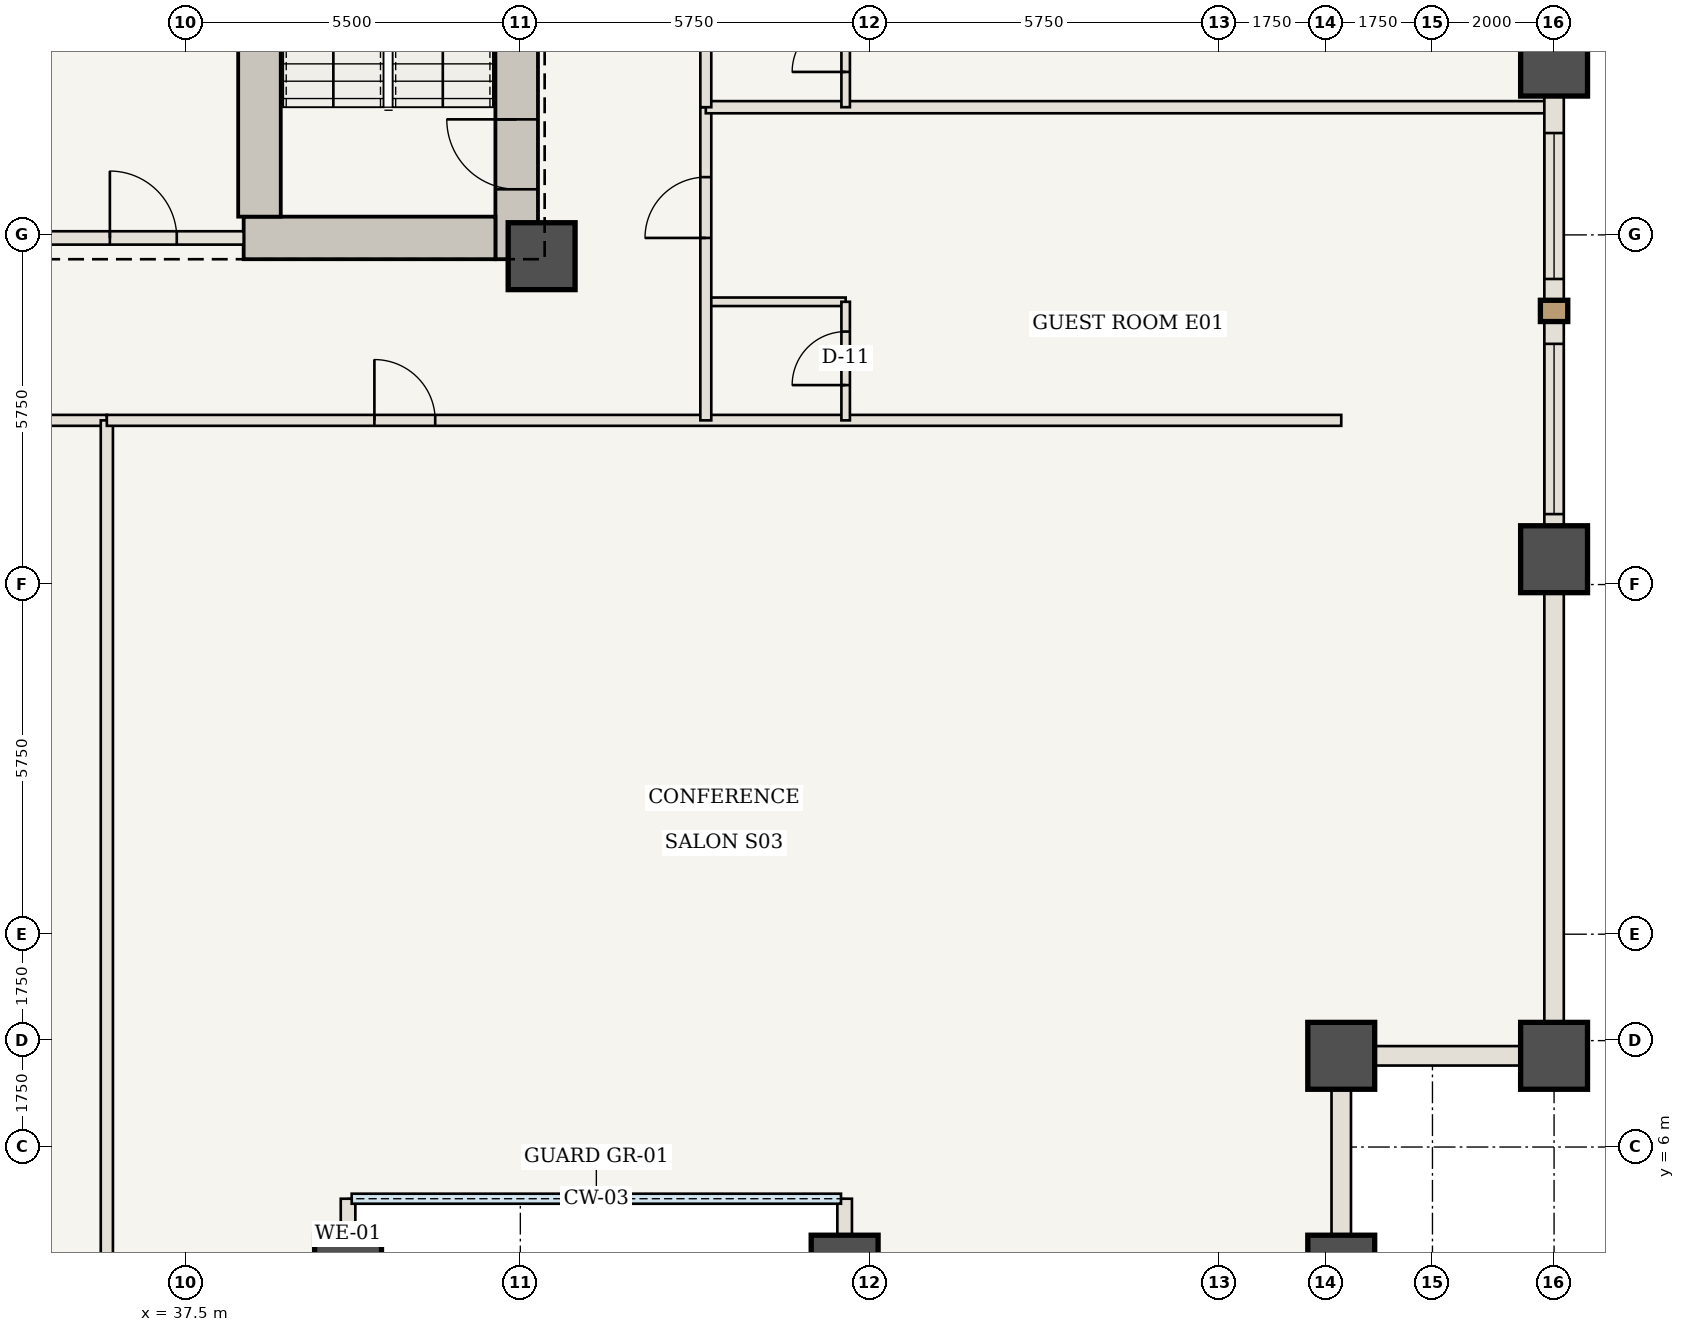
"""IFC4 building model, lengths in metres.
Left out: names, types, materials, properties, quantities, classifications, styles, units other than length and angle.
Written with IfcOpenShell. Run it as: python <this file> out.ifc"""

import sys

from ifc_helpers import new_model, si_unit, direction, frame, frame_2d, origin, origin_2d, place, context, subcontext, project, spatial, rectangle, extrude, element, fill, save


model = new_model("IFC4")
c1 = context("Model", 3, precision=1e-05, world=origin(), true_north=direction((0.0, 1.0)))
c2 = subcontext(c1, "Body", "Model", "MODEL_VIEW")
j1 = project(units=[si_unit("LENGTHUNIT", "METRE"), si_unit("PLANEANGLEUNIT", "RADIAN")], contexts=[c1])
p1 = place(None, origin())
s1 = spatial("IfcSite", under=j1, at=p1, CompositionType="ELEMENT")
p2 = place(p1, origin())
s2 = spatial("IfcBuilding", under=s1, at=p2, CompositionType="ELEMENT")
p3 = place(p2, frame((0.0, 0.0, 70.35)))
s3 = spatial("IfcBuildingStorey", under=s2, at=p3, CompositionType="ELEMENT", Elevation=70.35)
p4 = place(p3, frame((42.94, 20.6, 0.0), z_axis=(0.0, 0.0, 1.0), x_axis=(0.0, 1.0, 0.0)))
e1 = element("IfcWall", 1, at=p4, inside=s3, PredefinedType="SHEAR", context=c2, shape_type="SweptSolid", body=[
    extrude(rectangle(XDim=10.0, YDim=0.7, at=frame_2d((5.0, 0.0))), origin(), (0.0, 0.0, 1.0), 3.5),
])
p5 = place(p4, frame((1.15, 0.0, 0.0)))
e2 = element("IfcOpeningElement", 2, at=p5, cuts=e1, PredefinedType="OPENING", context=c2, shape_type="SweptSolid", body=[
    extrude(rectangle(XDim=1.15, YDim=2.15, at=frame_2d((0.575, 1.075))), frame((0.0, 0.36, 0.0), z_axis=(0.0, -1.0, 0.0), x_axis=(1.0, 0.0, 0.0)), (0.0, 0.0, 1.0), 0.72),
])
p6 = place(p3, frame((38.45, 20.95, 0.0), z_axis=(0.0, 0.0, 1.0), x_axis=(1.0, 0.0, 0.0)))
e3 = element("IfcWall", 3, at=p6, inside=s3, PredefinedType="SHEAR", context=c2, shape_type="SweptSolid", body=[
    extrude(rectangle(XDim=4.14, YDim=0.7, at=frame_2d((2.07, 0.0))), origin(), (0.0, 0.0, 1.0), 3.5),
])
p7 = place(p3, frame((38.71, 21.3, 0.0), z_axis=(0.0, 0.0, 1.0), x_axis=(0.0, 1.0, 0.0)))
e4 = element("IfcWall", 4, at=p7, inside=s3, PredefinedType="SHEAR", context=c2, shape_type="SweptSolid", body=[
    extrude(rectangle(XDim=9.3, YDim=0.7, at=frame_2d((4.65, 0.0))), origin(), (0.0, 0.0, 1.0), 3.5),
])
for number, where, z_axis, x_axis in (
    (5, (43.35, 20.65, 0.0), (0.0, 0.0, 1.0), (1.0, 0.0, 0.0)),
    (6, (56.5, 4.0, 0.0), (0.0, 0.0, 1.0), (1.0, 0.0, 0.0)),
    (7, (56.5, 7.5, 0.0), (0.0, 0.0, 1.0), (1.0, 0.0, 0.0)),
    (8, (60.0, 7.5, 0.0), (0.0, 0.0, 1.0), (1.0, 0.0, 0.0)),
    (9, (60.0, 15.667, 0.0), (0.0, 0.0, 1.0), (1.0, 0.0, 0.0)),
    (10, (60.0, 23.833, 0.0), (0.0, 0.0, 1.0), (1.0, 0.0, 0.0)),
    (11, (40.167, 4.0, 0.0), (0.0, 0.0, 1.0), (1.0, 0.0, 0.0)),
    (12, (48.333, 4.0, 0.0), (0.0, 0.0, 1.0), (1.0, 0.0, 0.0)),
):
    element("IfcColumn", number, at=place(p3, frame(where, z_axis=z_axis, x_axis=x_axis)), inside=s3, PredefinedType="COLUMN", context=c2, shape_type="SweptSolid", body=[
        extrude(rectangle(XDim=1.1, YDim=1.1, at=origin_2d()), origin(), (0.0, 0.0, 1.0), 3.5),
    ])
p8 = place(p3, frame((35.15, 20.95, 0.0), z_axis=(0.0, 0.0, 1.0), x_axis=(1.0, 0.0, 0.0)))
e13 = element("IfcWall", 13, at=p8, inside=s3, PredefinedType="STANDARD", context=c2, shape_type="SweptSolid", body=[
    extrude(rectangle(XDim=3.3, YDim=0.22, at=frame_2d((1.65, 0.0))), origin(), (0.0, 0.0, 1.0), 3.32),
])
p9 = place(p8, frame((1.1, 0.0, 0.0)))
e14 = element("IfcOpeningElement", 14, at=p9, cuts=e13, PredefinedType="OPENING", context=c2, shape_type="SweptSolid", body=[
    extrude(rectangle(XDim=1.1, YDim=2.15, at=frame_2d((0.55, 1.075))), frame((0.0, 0.12, 0.0), z_axis=(0.0, -1.0, 0.0), x_axis=(1.0, 0.0, 0.0)), (0.0, 0.0, 1.0), 0.24),
])
p10 = place(p3, frame((21.8, 17.95, 0.0), z_axis=(0.0, 0.0, 1.0), x_axis=(1.0, 0.0, 0.0)))
e15 = element("IfcWall", 15, at=p10, inside=s3, PredefinedType="STANDARD", context=c2, shape_type="SweptSolid", body=[
    extrude(rectangle(XDim=14.4, YDim=0.18, at=frame_2d((7.2, 0.0))), origin(), (0.0, 0.0, 1.0), 3.32),
])
p11 = place(p10, frame((8.15, 0.0, 0.0)))
e16 = element("IfcOpeningElement", 16, at=p11, cuts=e15, PredefinedType="OPENING", context=c2, shape_type="SweptSolid", body=[
    extrude(rectangle(XDim=1.0, YDim=2.15, at=frame_2d((0.5, 1.075))), frame((0.0, 0.1, 0.0), z_axis=(0.0, -1.0, 0.0), x_axis=(1.0, 0.0, 0.0)), (0.0, 0.0, 1.0), 0.2),
])
p12 = place(p3, frame((36.2, 4.06, 0.0), z_axis=(0.0, 0.0, 1.0), x_axis=(0.0, 1.0, 0.0)))
e17 = element("IfcWall", 17, at=p12, inside=s3, PredefinedType="STANDARD", context=c2, shape_type="SweptSolid", body=[
    extrude(rectangle(XDim=13.89, YDim=0.2, at=frame_2d((6.945, 0.0))), origin(), (0.0, 0.0, 1.0), 3.32),
])
p13 = place(p3, frame((36.2, 17.95, 0.0), z_axis=(0.0, 0.0, 1.0), x_axis=(1.0, 0.0, 0.0)))
e18 = element("IfcWall", 18, at=p13, inside=s3, PredefinedType="STANDARD", context=c2, shape_type="SweptSolid", body=[
    extrude(rectangle(XDim=20.3, YDim=0.18, at=frame_2d((10.15, 0.0))), origin(), (0.0, 0.0, 1.0), 3.32),
])
p14 = place(p13, frame((4.4, 0.0, 0.0)))
e19 = element("IfcOpeningElement", 19, at=p14, cuts=e18, PredefinedType="OPENING", context=c2, shape_type="SweptSolid", body=[
    extrude(rectangle(XDim=1.0, YDim=2.15, at=frame_2d((0.5, 1.075))), frame((0.0, 0.1, 0.0), z_axis=(0.0, -1.0, 0.0), x_axis=(1.0, 0.0, 0.0)), (0.0, 0.0, 1.0), 0.2),
])
p15 = place(p3, frame((46.05, 19.9, 0.0), z_axis=(0.0, 0.0, 1.0), x_axis=(1.0, 0.0, 0.0)))
e20 = element("IfcWall", 20, at=p15, inside=s3, PredefinedType="STANDARD", context=c2, shape_type="SweptSolid", body=[
    extrude(rectangle(XDim=2.3, YDim=0.14, at=frame_2d((1.15, 0.0))), origin(), (0.0, 0.0, 1.0), 3.32),
])
p16 = place(p3, frame((48.35, 17.95, 0.0), z_axis=(0.0, 0.0, 1.0), x_axis=(0.0, 1.0, 0.0)))
e21 = element("IfcWall", 21, at=p16, inside=s3, PredefinedType="STANDARD", context=c2, shape_type="SweptSolid", body=[
    extrude(rectangle(XDim=1.95, YDim=0.14, at=frame_2d((0.975, 0.0))), origin(), (0.0, 0.0, 1.0), 3.32),
])
p17 = place(p16, frame((0.58, 0.0, 0.0)))
e22 = element("IfcOpeningElement", 22, at=p17, cuts=e21, PredefinedType="OPENING", context=c2, shape_type="SweptSolid", body=[
    extrude(rectangle(XDim=0.88, YDim=2.1, at=frame_2d((0.44, 1.05))), frame((0.0, 0.08, 0.0), z_axis=(0.0, -1.0, 0.0), x_axis=(1.0, 0.0, 0.0)), (0.0, 0.0, 1.0), 0.16),
])
p18 = place(p3, frame((46.05, 17.95, 0.0), z_axis=(0.0, 0.0, 1.0), x_axis=(0.0, 1.0, 0.0)))
e23 = element("IfcWall", 23, at=p18, inside=s3, PredefinedType="STANDARD", context=c2, shape_type="SweptSolid", body=[
    extrude(rectangle(XDim=5.15, YDim=0.18, at=frame_2d((2.575, 0.0))), origin(), (0.0, 0.0, 1.0), 3.32),
])
p19 = place(p18, frame((3.0, 0.0, 0.0)))
e24 = element("IfcOpeningElement", 24, at=p19, cuts=e23, PredefinedType="OPENING", context=c2, shape_type="SweptSolid", body=[
    extrude(rectangle(XDim=1.0, YDim=2.15, at=frame_2d((0.5, 1.075))), frame((0.0, 0.1, 0.0), z_axis=(0.0, -1.0, 0.0), x_axis=(1.0, 0.0, 0.0)), (0.0, 0.0, 1.0), 0.2),
])
p20 = place(p3, frame((46.05, 23.1, 0.0), z_axis=(0.0, 0.0, 1.0), x_axis=(1.0, 0.0, 0.0)))
e25 = element("IfcWall", 25, at=p20, inside=s3, PredefinedType="STANDARD", context=c2, shape_type="SweptSolid", body=[
    extrude(rectangle(XDim=13.89, YDim=0.2, at=frame_2d((6.945, 0.0))), origin(), (0.0, 0.0, 1.0), 3.32),
])
p21 = place(p3, frame((48.35, 23.1, 0.0), z_axis=(0.0, 0.0, 1.0), x_axis=(0.0, 1.0, 0.0)))
e26 = element("IfcWall", 26, at=p21, inside=s3, PredefinedType="STANDARD", context=c2, shape_type="SweptSolid", body=[
    extrude(rectangle(XDim=1.95, YDim=0.14, at=frame_2d((0.975, 0.0))), origin(), (0.0, 0.0, 1.0), 3.32),
])
p22 = place(p21, frame((0.58, 0.0, 0.0)))
e27 = element("IfcOpeningElement", 27, at=p22, cuts=e26, PredefinedType="OPENING", context=c2, shape_type="SweptSolid", body=[
    extrude(rectangle(XDim=0.88, YDim=2.1, at=frame_2d((0.44, 1.05))), frame((0.0, 0.08, 0.0), z_axis=(0.0, -1.0, 0.0), x_axis=(1.0, 0.0, 0.0)), (0.0, 0.0, 1.0), 0.16),
])
p23 = place(p3, frame((46.05, 23.1, 0.0), z_axis=(0.0, 0.0, 1.0), x_axis=(0.0, 1.0, 0.0)))
e28 = element("IfcWall", 28, at=p23, inside=s3, PredefinedType="STANDARD", context=c2, shape_type="SweptSolid", body=[
    extrude(rectangle(XDim=4.7, YDim=0.18, at=frame_2d((2.35, 0.0))), origin(), (0.0, 0.0, 1.0), 3.32),
])
p24 = place(p23, frame((2.775, 0.0, 0.0)))
e29 = element("IfcOpeningElement", 29, at=p24, cuts=e28, PredefinedType="OPENING", context=c2, shape_type="SweptSolid", body=[
    extrude(rectangle(XDim=1.0, YDim=2.15, at=frame_2d((0.5, 1.075))), frame((0.0, 0.1, 0.0), z_axis=(0.0, -1.0, 0.0), x_axis=(1.0, 0.0, 0.0)), (0.0, 0.0, 1.0), 0.2),
])
for number, where, z_axis, x_axis in (
    (30, (40.167, 4.0, 0.0), (0.0, 0.0, 1.0), (0.0, 1.0, 0.0)),
    (31, (48.333, 4.0, 0.0), (0.0, 0.0, 1.0), (0.0, 1.0, 0.0)),
):
    element("IfcWall", number, at=place(p3, frame(where, z_axis=z_axis, x_axis=x_axis)), inside=s3, PredefinedType="USERDEFINED", context=c2, shape_type="SweptSolid", body=[
        extrude(rectangle(XDim=1.15, YDim=0.24, at=frame_2d((0.575, 0.0))), origin(), (0.0, 0.0, 1.0), 2.52),
    ])
p25 = place(p3, frame((60.0, 15.667, 0.0), z_axis=(0.0, 0.0, 1.0), x_axis=(0.0, -1.0, 0.0)))
e32 = element("IfcWall", 32, at=p25, inside=s3, PredefinedType="USERDEFINED", context=c2, shape_type="SweptSolid", body=[
    extrude(rectangle(XDim=8.167, YDim=0.32, at=frame_2d((4.083, 0.0))), origin(), (0.0, 0.0, 1.0), 2.52),
])
p26 = place(p3, frame((60.0, 23.833, 0.0), z_axis=(0.0, 0.0, 1.0), x_axis=(0.0, -1.0, 0.0)))
e33 = element("IfcWall", 33, at=p26, inside=s3, PredefinedType="USERDEFINED", context=c2, shape_type="SweptSolid", body=[
    extrude(rectangle(XDim=8.167, YDim=0.32, at=frame_2d((4.083, 0.0))), origin(), (0.0, 0.0, 1.0), 2.52),
])
p27 = place(p26, frame((1.158, 0.0, 0.85)))
e34 = element("IfcOpeningElement", 34, at=p27, cuts=e33, PredefinedType="OPENING", context=c2, shape_type="SweptSolid", body=[
    extrude(rectangle(XDim=2.4, YDim=1.47, at=frame_2d((1.2, 0.735))), frame((0.0, 0.17, 0.0), z_axis=(0.0, -1.0, 0.0), x_axis=(1.0, 0.0, 0.0)), (0.0, 0.0, 1.0), 0.34),
])
p28 = place(p26, frame((4.625, 0.0, 0.85)))
e35 = element("IfcOpeningElement", 35, at=p28, cuts=e33, PredefinedType="OPENING", context=c2, shape_type="SweptSolid", body=[
    extrude(rectangle(XDim=2.8, YDim=1.47, at=frame_2d((1.4, 0.735))), frame((0.0, 0.17, 0.0), z_axis=(0.0, -1.0, 0.0), x_axis=(1.0, 0.0, 0.0)), (0.0, 0.0, 1.0), 0.34),
])
p29 = place(p3, frame((60.0, 32.0, 0.0), z_axis=(0.0, 0.0, 1.0), x_axis=(0.0, -1.0, 0.0)))
e36 = element("IfcWall", 36, at=p29, inside=s3, PredefinedType="USERDEFINED", context=c2, shape_type="SweptSolid", body=[
    extrude(rectangle(XDim=8.167, YDim=0.32, at=frame_2d((4.083, 0.0))), origin(), (0.0, 0.0, 1.0), 2.52),
])
p30 = place(p29, frame((1.05, 0.0, 0.85)))
e37 = element("IfcOpeningElement", 37, at=p30, cuts=e36, PredefinedType="OPENING", context=c2, shape_type="SweptSolid", body=[
    extrude(rectangle(XDim=2.4, YDim=1.47, at=frame_2d((1.2, 0.735))), frame((0.0, 0.17, 0.0), z_axis=(0.0, -1.0, 0.0), x_axis=(1.0, 0.0, 0.0)), (0.0, 0.0, 1.0), 0.34),
])
p31 = place(p29, frame((4.833, 0.0, 0.85)))
e38 = element("IfcOpeningElement", 38, at=p31, cuts=e36, PredefinedType="OPENING", context=c2, shape_type="SweptSolid", body=[
    extrude(rectangle(XDim=2.4, YDim=1.47, at=frame_2d((1.2, 0.735))), frame((0.0, 0.17, 0.0), z_axis=(0.0, -1.0, 0.0), x_axis=(1.0, 0.0, 0.0)), (0.0, 0.0, 1.0), 0.34),
])
for number, where, z_axis, x_axis in (
    (39, (56.5, 7.5, 0.0), (0.0, 0.0, 1.0), (0.0, -1.0, 0.0)),
    (40, (60.0, 7.5, 0.0), (0.0, 0.0, 1.0), (-1.0, 0.0, 0.0)),
):
    element("IfcWall", number, at=place(p3, frame(where, z_axis=z_axis, x_axis=x_axis)), inside=s3, PredefinedType="USERDEFINED", context=c2, shape_type="SweptSolid", body=[
        extrude(rectangle(XDim=3.5, YDim=0.32, at=frame_2d((1.75, 0.0))), origin(), (0.0, 0.0, 1.0), 2.52),
    ])
p32 = place(p5, origin())
e41 = element("IfcDoor", 41, at=p32, inside=s3, OperationType="SINGLE_SWING_RIGHT", PredefinedType="DOOR", context=c2, shape_type="SweptSolid", body=[
    extrude(rectangle(XDim=1.15, YDim=2.15, at=frame_2d((0.575, 1.075))), frame((0.0, 0.025, 0.0), z_axis=(0.0, -1.0, 0.0), x_axis=(1.0, 0.0, 0.0)), (0.0, 0.0, 1.0), 0.05),
])
fill(e2, e41)
p33 = place(p9, origin())
e42 = element("IfcDoor", 42, at=p33, inside=s3, OperationType="SINGLE_SWING_LEFT", PredefinedType="DOOR", context=c2, shape_type="SweptSolid", body=[
    extrude(rectangle(XDim=1.1, YDim=2.15, at=frame_2d((0.55, 1.075))), frame((0.0, 0.025, 0.0), z_axis=(0.0, -1.0, 0.0), x_axis=(1.0, 0.0, 0.0)), (0.0, 0.0, 1.0), 0.05),
])
fill(e14, e42)
p34 = place(p14, origin())
e43 = element("IfcDoor", 43, at=p34, inside=s3, OperationType="SINGLE_SWING_LEFT", PredefinedType="DOOR", context=c2, shape_type="SweptSolid", body=[
    extrude(rectangle(XDim=1.0, YDim=2.15, at=frame_2d((0.5, 1.075))), frame((0.0, 0.025, 0.0), z_axis=(0.0, -1.0, 0.0), x_axis=(1.0, 0.0, 0.0)), (0.0, 0.0, 1.0), 0.05),
])
fill(e19, e43)
p35 = place(p17, origin())
e44 = element("IfcDoor", 44, at=p35, inside=s3, OperationType="SINGLE_SWING_LEFT", PredefinedType="DOOR", context=c2, shape_type="SweptSolid", body=[
    extrude(rectangle(XDim=0.88, YDim=2.1, at=frame_2d((0.44, 1.05))), frame((0.0, 0.025, 0.0), z_axis=(0.0, -1.0, 0.0), x_axis=(1.0, 0.0, 0.0)), (0.0, 0.0, 1.0), 0.05),
])
fill(e22, e44)
p36 = place(p19, origin())
e45 = element("IfcDoor", 45, at=p36, inside=s3, OperationType="SINGLE_SWING_LEFT", PredefinedType="DOOR", context=c2, shape_type="SweptSolid", body=[
    extrude(rectangle(XDim=1.0, YDim=2.15, at=frame_2d((0.5, 1.075))), frame((0.0, 0.025, 0.0), z_axis=(0.0, -1.0, 0.0), x_axis=(1.0, 0.0, 0.0)), (0.0, 0.0, 1.0), 0.05),
])
fill(e24, e45)
p37 = place(p22, origin())
e46 = element("IfcDoor", 46, at=p37, inside=s3, OperationType="SINGLE_SWING_LEFT", PredefinedType="DOOR", context=c2, shape_type="SweptSolid", body=[
    extrude(rectangle(XDim=0.88, YDim=2.1, at=frame_2d((0.44, 1.05))), frame((0.0, 0.025, 0.0), z_axis=(0.0, -1.0, 0.0), x_axis=(1.0, 0.0, 0.0)), (0.0, 0.0, 1.0), 0.05),
])
fill(e27, e46)
p38 = place(p27, origin())
e47 = element("IfcWindow", 47, at=p38, inside=s3, PartitioningType="SINGLE_PANEL", PredefinedType="WINDOW", context=c2, shape_type="SweptSolid", body=[
    extrude(rectangle(XDim=2.4, YDim=1.47, at=frame_2d((1.2, 0.735))), frame((0.0, 0.03, 0.0), z_axis=(0.0, -1.0, 0.0), x_axis=(1.0, 0.0, 0.0)), (0.0, 0.0, 1.0), 0.06),
])
fill(e34, e47)
p39 = place(p28, origin())
e48 = element("IfcWindow", 48, at=p39, inside=s3, PartitioningType="SINGLE_PANEL", PredefinedType="WINDOW", context=c2, shape_type="SweptSolid", body=[
    extrude(rectangle(XDim=2.8, YDim=1.47, at=frame_2d((1.4, 0.735))), frame((0.0, 0.03, 0.0), z_axis=(0.0, -1.0, 0.0), x_axis=(1.0, 0.0, 0.0)), (0.0, 0.0, 1.0), 0.06),
])
fill(e35, e48)
save(model, sys.argv[1])
